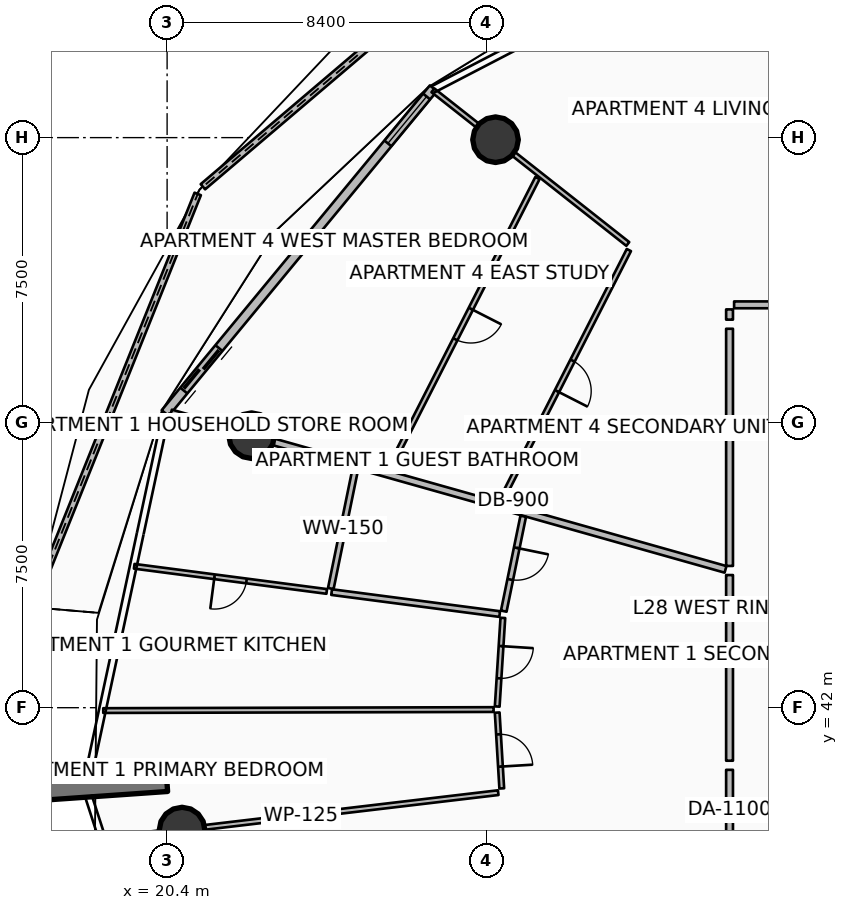
"""IFC4 building model, lengths in metres.
Left out: names, types, materials, properties, quantities, classifications, styles, units other than length and angle.
Written with IfcOpenShell. Run it as: python <this file> out.ifc"""

import sys

from ifc_helpers import new_model, si_unit, direction, frame, frame_2d, origin, origin_2d, place, context, subcontext, project, spatial, polyline, rectangle, circle, outline, extrude, element, fill, save


model = new_model("IFC4")
c1 = context("Model", 3, precision=1e-05, world=origin(), true_north=direction((0.0, 1.0)))
c2 = subcontext(c1, "Body", "Model", "MODEL_VIEW")
j1 = project(units=[si_unit("LENGTHUNIT", "METRE"), si_unit("PLANEANGLEUNIT", "RADIAN")], contexts=[c1])
p1 = place(None, origin())
s1 = spatial("IfcSite", under=j1, at=p1, CompositionType="ELEMENT")
p2 = place(p1, origin())
s2 = spatial("IfcBuilding", under=s1, at=p2, CompositionType="ELEMENT")
p3 = place(p2, frame((0.0, 0.0, 112.65)))
s3 = spatial("IfcBuildingStorey", under=s2, at=p3, CompositionType="ELEMENT", Elevation=112.65)
p4 = place(p3, frame((20.394, 40.07, 0.0), z_axis=(0.0, 0.0, 1.0), x_axis=(-0.997564163539, -0.069754853754, 0.0)))
e1 = element("IfcWall", 1, at=p4, inside=s3, PredefinedType="SOLIDWALL", context=c2, shape_type="SweptSolid", body=[
    extrude(rectangle(XDim=3.5, YDim=0.55, at=frame_2d((1.75, 0.0))), origin(), (0.0, 0.0, 1.0), 3.75),
])
p5 = place(p3, frame((29.042, 56.945, 0.0), z_axis=(0.23244676176, -0.183255946608, 0.95518886142), x_axis=(0.619114149501, 0.785301005913, 0.0)))
e2 = element("IfcColumn", 2, at=p5, inside=s3, PredefinedType="COLUMN", context=c2, shape_type="SweptSolid", body=[
    extrude(circle(Radius=0.6, at=origin_2d()), origin(), (0.0, 0.0, 1.0), 3.633),
])
p6 = place(p3, frame((22.623, 49.157, 0.0), z_axis=(0.308482748796, -0.087033586072, 0.947239963574), x_axis=(0.271534237934, 0.962428780549, 0.0)))
e3 = element("IfcColumn", 3, at=p6, inside=s3, PredefinedType="COLUMN", context=c2, shape_type="SweptSolid", body=[
    extrude(circle(Radius=0.6, at=origin_2d()), origin(), (0.0, 0.0, 1.0), 3.664),
])
p7 = place(p3, frame((20.793, 38.78, 0.0), z_axis=(0.329335891795, 0.039026502293, 0.943405958479), x_axis=(-0.117677249874, 0.993051894345, 0.0)))
e4 = element("IfcColumn", 4, at=p7, inside=s3, PredefinedType="COLUMN", context=c2, shape_type="SweptSolid", body=[
    extrude(circle(Radius=0.6, at=origin_2d()), origin(), (0.0, 0.0, 1.0), 3.678),
])
p8 = place(p3, frame((29.874, 62.962, 0.0), z_axis=(0.0, 0.0, 1.0), x_axis=(-0.761849488871, -0.647754086291, 0.0)))
e5 = element("IfcWall", 5, at=p8, inside=s3, PredefinedType="PARAPET", context=c2, shape_type="SweptSolid", body=[
    extrude(outline(polyline([(0.0, 0.0), (11.2, 0.0), (11.2, 1.632), (5.6, 1.798), (0.0, 1.86), (0.0, 0.0)])), frame((0.0, 0.09, 0.0), z_axis=(0.0, -1.0, 0.0), x_axis=(1.0, 0.0, 0.0)), (0.0, 0.0, 1.0), 0.18),
])
p9 = place(p3, frame((21.206, 55.518, 0.0), z_axis=(0.0, 0.0, 1.0), x_axis=(-0.372543477275, -0.928014739937, 0.0)))
e6 = element("IfcWall", 6, at=p9, inside=s3, PredefinedType="PARAPET", context=c2, shape_type="SweptSolid", body=[
    extrude(outline(polyline([(0.0, 0.0), (11.718, 0.0), (11.718, 1.233), (5.859, 1.418), (0.0, 1.632), (0.0, 0.0)])), frame((0.0, 0.09, 0.0), z_axis=(0.0, -1.0, 0.0), x_axis=(1.0, 0.0, 0.0)), (0.0, 0.0, 1.0), 0.18),
])
p10 = place(p3, frame((27.407, 58.298, 0.0), z_axis=(0.0, 0.0, 1.0), x_axis=(-0.636704975, -0.771107498868, 0.0)))
e7 = element("IfcWall", 7, at=p10, inside=s3, PredefinedType="SOLIDWALL", context=c2, shape_type="SweptSolid", body=[
    extrude(rectangle(XDim=11.084, YDim=0.24, at=frame_2d((5.542, 0.0))), origin(), (0.0, 0.0, 1.0), 2.42),
])
p11 = place(p10, frame((8.864, 0.0, 0.0)))
e8 = element("IfcOpeningElement", 8, at=p11, cuts=e7, PredefinedType="OPENING", context=c2, shape_type="SweptSolid", body=[
    extrude(rectangle(XDim=1.45, YDim=2.15, at=frame_2d((0.725, 1.075))), frame((0.0, 0.13, 0.0), z_axis=(0.0, -1.0, 0.0), x_axis=(1.0, 0.0, 0.0)), (0.0, 0.0, 1.0), 0.26),
])
p12 = place(p10, frame((0.28, 0.0, 0.65)))
e9 = element("IfcOpeningElement", 9, at=p12, cuts=e7, PredefinedType="OPENING", context=c2, shape_type="SweptSolid", body=[
    extrude(rectangle(XDim=1.6, YDim=1.5, at=frame_2d((0.8, 0.75))), frame((0.0, 0.13, 0.0), z_axis=(0.0, -1.0, 0.0), x_axis=(1.0, 0.0, 0.0)), (0.0, 0.0, 1.0), 0.26),
])
p13 = place(p3, frame((35.094, 45.64, 0.0), z_axis=(0.0, 0.0, 1.0), x_axis=(-0.962454745894, 0.271442189251, 0.0)))
e10 = element("IfcWall", 10, at=p13, inside=s3, PredefinedType="PARTITIONING", context=c2, shape_type="SweptSolid", body=[
    extrude(rectangle(XDim=15.162, YDim=0.18, at=frame_2d((7.581, 0.0))), origin(), (0.0, 0.0, 1.0), 2.427),
])
p14 = place(p3, frame((35.2, 40.365, 0.0), z_axis=(0.0, 0.0, 1.0), x_axis=(0.0, -1.0, 0.0)))
e11 = element("IfcWall", 11, at=p14, inside=s3, PredefinedType="PARTITIONING", context=c2, shape_type="SweptSolid", body=[
    extrude(rectangle(XDim=5.413, YDim=0.18, at=frame_2d((2.707, 0.0))), origin(), (0.0, 0.0, 1.0), 2.427),
])
p15 = place(p14, frame((2.156, 0.0, 0.0)))
e12 = element("IfcOpeningElement", 12, at=p15, cuts=e11, PredefinedType="OPENING", context=c2, shape_type="SweptSolid", body=[
    extrude(rectangle(XDim=1.1, YDim=2.1, at=frame_2d((0.55, 1.05))), frame((0.0, 0.1, 0.0), z_axis=(0.0, -1.0, 0.0), x_axis=(1.0, 0.0, 0.0)), (0.0, 0.0, 1.0), 0.2),
])
p16 = place(p3, frame((35.2, 45.49, 0.0), z_axis=(0.0, 0.0, 1.0), x_axis=(0.0, -1.0, 0.0)))
e13 = element("IfcWall", 13, at=p16, inside=s3, PredefinedType="PARTITIONING", context=c2, shape_type="SweptSolid", body=[
    extrude(rectangle(XDim=4.885, YDim=0.18, at=frame_2d((2.442, 0.0))), origin(), (0.0, 0.0, 1.0), 2.427),
])
p17 = place(p3, frame((29.113, 39.764, 0.0), z_axis=(0.0, 0.0, 1.0), x_axis=(-0.993070875002, -0.117516965677, 0.0)))
e14 = element("IfcWall", 14, at=p17, inside=s3, PredefinedType="PARTITIONING", context=c2, shape_type="SweptSolid", body=[
    extrude(rectangle(XDim=10.46, YDim=0.125, at=frame_2d((5.23, 0.0))), origin(), (0.0, 0.0, 1.0), 2.427),
])
p18 = place(p3, frame((29.771, 47.037, 0.0), z_axis=(0.0, 0.0, 1.0), x_axis=(-0.201031337284, -0.979584810739, 0.0)))
e15 = element("IfcWall", 15, at=p18, inside=s3, PredefinedType="PARTITIONING", context=c2, shape_type="SweptSolid", body=[
    extrude(rectangle(XDim=2.549, YDim=0.15, at=frame_2d((1.274, 0.0))), origin(), (0.0, 0.0, 1.0), 2.427),
])
p19 = place(p18, frame((0.85, 0.0, 0.0)))
e16 = element("IfcOpeningElement", 16, at=p19, cuts=e15, PredefinedType="OPENING", context=c2, shape_type="SweptSolid", body=[
    extrude(rectangle(XDim=0.85, YDim=2.06, at=frame_2d((0.425, 1.03))), frame((0.0, 0.085, 0.0), z_axis=(0.0, -1.0, 0.0), x_axis=(1.0, 0.0, 0.0)), (0.0, 0.0, 1.0), 0.17),
])
p20 = place(p3, frame((25.354, 48.283, 0.0), z_axis=(0.0, 0.0, 1.0), x_axis=(-0.201037617238, -0.979583521939, 0.0)))
e17 = element("IfcWall", 17, at=p20, inside=s3, PredefinedType="PARTITIONING", context=c2, shape_type="SweptSolid", body=[
    extrude(rectangle(XDim=3.213, YDim=0.15, at=frame_2d((1.607, 0.0))), origin(), (0.0, 0.0, 1.0), 2.427),
])
p21 = place(p3, frame((29.151, 44.464, 0.0), z_axis=(0.0, 0.0, 1.0), x_axis=(-0.991563130501, 0.129624682181, 0.0)))
e18 = element("IfcWall", 18, at=p21, inside=s3, PredefinedType="PARTITIONING", context=c2, shape_type="SweptSolid", body=[
    extrude(rectangle(XDim=4.46, YDim=0.15, at=frame_2d((2.23, 0.0))), origin(), (0.0, 0.0, 1.0), 2.91),
])
p22 = place(p3, frame((24.6, 45.059, 0.0), z_axis=(0.0, 0.0, 1.0), x_axis=(-0.991566000337, 0.129602727501, 0.0)))
e19 = element("IfcWall", 19, at=p22, inside=s3, PredefinedType="PARTITIONING", context=c2, shape_type="SweptSolid", body=[
    extrude(rectangle(XDim=5.109, YDim=0.125, at=frame_2d((2.554, 0.0))), origin(), (0.0, 0.0, 1.0), 2.445),
])
p23 = place(p22, frame((2.129, 0.0, 0.0)))
e20 = element("IfcOpeningElement", 20, at=p23, cuts=e19, PredefinedType="OPENING", context=c2, shape_type="SweptSolid", body=[
    extrude(rectangle(XDim=0.85, YDim=2.06, at=frame_2d((0.425, 1.03))), frame((0.0, 0.073, 0.0), z_axis=(0.0, -1.0, 0.0), x_axis=(1.0, 0.0, 0.0)), (0.0, 0.0, 1.0), 0.145),
])
p24 = place(p3, frame((28.991, 41.951, 0.0), z_axis=(0.0, 0.0, 1.0), x_axis=(-0.999996643903, -0.002590788034, 0.0)))
e21 = element("IfcWall", 21, at=p24, inside=s3, PredefinedType="PARTITIONING", context=c2, shape_type="SweptSolid", body=[
    extrude(rectangle(XDim=10.271, YDim=0.125, at=frame_2d((5.136, 0.0))), origin(), (0.0, 0.0, 1.0), 2.445),
])
p25 = place(p3, frame((29.235, 44.362, 0.0), z_axis=(0.0, 0.0, 1.0), x_axis=(-0.063647003528, -0.99797247404, 0.0)))
e22 = element("IfcWall", 22, at=p25, inside=s3, PredefinedType="PARTITIONING", context=c2, shape_type="SweptSolid", body=[
    extrude(rectangle(XDim=2.336, YDim=0.125, at=frame_2d((1.168, 0.0))), origin(), (0.0, 0.0, 1.0), 2.91),
])
p26 = place(p25, frame((0.743, 0.0, 0.0)))
e23 = element("IfcOpeningElement", 23, at=p26, cuts=e22, PredefinedType="OPENING", context=c2, shape_type="SweptSolid", body=[
    extrude(rectangle(XDim=0.85, YDim=2.06, at=frame_2d((0.425, 1.03))), frame((0.0, 0.073, 0.0), z_axis=(0.0, -1.0, 0.0), x_axis=(1.0, 0.0, 0.0)), (0.0, 0.0, 1.0), 0.145),
])
p27 = place(p3, frame((29.086, 41.871, 0.0), z_axis=(0.0, 0.0, 1.0), x_axis=(0.060104090143, -0.99819211495, 0.0)))
e24 = element("IfcWall", 24, at=p27, inside=s3, PredefinedType="PARTITIONING", context=c2, shape_type="SweptSolid", body=[
    extrude(rectangle(XDim=1.999, YDim=0.125, at=frame_2d((0.999, 0.0))), origin(), (0.0, 0.0, 1.0), 2.427),
])
p28 = place(p27, frame((0.574, 0.0, 0.0)))
e25 = element("IfcOpeningElement", 25, at=p28, cuts=e24, PredefinedType="OPENING", context=c2, shape_type="SweptSolid", body=[
    extrude(rectangle(XDim=0.85, YDim=2.06, at=frame_2d((0.425, 1.03))), frame((0.0, 0.073, 0.0), z_axis=(0.0, -1.0, 0.0), x_axis=(1.0, 0.0, 0.0)), (0.0, 0.0, 1.0), 0.145),
])
p29 = place(p3, frame((41.944, 52.6, 0.0), z_axis=(0.0, 0.0, 1.0), x_axis=(-1.0, 0.0, 0.0)))
e26 = element("IfcWall", 26, at=p29, inside=s3, PredefinedType="PARTITIONING", context=c2, shape_type="SweptSolid", body=[
    extrude(rectangle(XDim=6.624, YDim=0.18, at=frame_2d((3.312, 0.0))), origin(), (0.0, 0.0, 1.0), 2.427),
])
p30 = place(p29, frame((2.762, 0.0, 0.0)))
e27 = element("IfcOpeningElement", 27, at=p30, cuts=e26, PredefinedType="OPENING", context=c2, shape_type="SweptSolid", body=[
    extrude(rectangle(XDim=1.1, YDim=2.1, at=frame_2d((0.55, 1.05))), frame((0.0, 0.1, 0.0), z_axis=(0.0, -1.0, 0.0), x_axis=(1.0, 0.0, 0.0)), (0.0, 0.0, 1.0), 0.2),
])
p31 = place(p3, frame((35.2, 52.48, 0.0), z_axis=(0.0, 0.0, 1.0), x_axis=(0.0, -1.0, 0.0)))
e28 = element("IfcWall", 28, at=p31, inside=s3, PredefinedType="PARTITIONING", context=c2, shape_type="SweptSolid", body=[
    extrude(rectangle(XDim=0.269, YDim=0.18, at=frame_2d((0.135, 0.0))), origin(), (0.0, 0.0, 1.0), 2.427),
])
p32 = place(p3, frame((35.2, 51.971, 0.0), z_axis=(0.0, 0.0, 1.0), x_axis=(0.0, -1.0, 0.0)))
e29 = element("IfcWall", 29, at=p32, inside=s3, PredefinedType="PARTITIONING", context=c2, shape_type="SweptSolid", body=[
    extrude(rectangle(XDim=6.241, YDim=0.18, at=frame_2d((3.12, 0.0))), origin(), (0.0, 0.0, 1.0), 2.427),
])
p33 = place(p3, frame((32.522, 54.202, 0.0), z_axis=(0.0, 0.0, 1.0), x_axis=(-0.785296086335, 0.619120389574, 0.0)))
e30 = element("IfcWall", 30, at=p33, inside=s3, PredefinedType="PARTITIONING", context=c2, shape_type="SweptSolid", body=[
    extrude(rectangle(XDim=6.529, YDim=0.125, at=frame_2d((3.265, 0.0))), origin(), (0.0, 0.0, 1.0), 2.427),
])
p34 = place(p3, frame((32.551, 54.042, 0.0), z_axis=(0.0, 0.0, 1.0), x_axis=(-0.45400796994, -0.890997622461, 0.0)))
e31 = element("IfcWall", 31, at=p34, inside=s3, PredefinedType="PARTITIONING", context=c2, shape_type="SweptSolid", body=[
    extrude(rectangle(XDim=7.431, YDim=0.125, at=frame_2d((3.716, 0.0))), origin(), (0.0, 0.0, 1.0), 2.427),
])
p35 = place(p34, frame((3.265, 0.0, 0.0)))
e32 = element("IfcOpeningElement", 32, at=p35, cuts=e31, PredefinedType="OPENING", context=c2, shape_type="SweptSolid", body=[
    extrude(rectangle(XDim=0.9, YDim=2.08, at=frame_2d((0.45, 1.04))), frame((0.0, 0.073, 0.0), z_axis=(0.0, -1.0, 0.0), x_axis=(1.0, 0.0, 0.0)), (0.0, 0.0, 1.0), 0.145),
])
p36 = place(p3, frame((30.146, 55.938, 0.0), z_axis=(0.0, 0.0, 1.0), x_axis=(-0.454004640198, -0.890999319124, 0.0)))
e33 = element("IfcWall", 33, at=p36, inside=s3, PredefinedType="PARTITIONING", context=c2, shape_type="SweptSolid", body=[
    extrude(rectangle(XDim=8.626, YDim=0.125, at=frame_2d((4.313, 0.0))), origin(), (0.0, 0.0, 1.0), 2.427),
])
p37 = place(p36, frame((3.863, 0.0, 0.0)))
e34 = element("IfcOpeningElement", 34, at=p37, cuts=e33, PredefinedType="OPENING", context=c2, shape_type="SweptSolid", body=[
    extrude(rectangle(XDim=0.9, YDim=2.08, at=frame_2d((0.45, 1.04))), frame((0.0, 0.073, 0.0), z_axis=(0.0, -1.0, 0.0), x_axis=(1.0, 0.0, 0.0)), (0.0, 0.0, 1.0), 0.145),
])
p38 = place(p11, origin())
e35 = element("IfcDoor", 35, at=p38, inside=s3, OperationType="DOUBLE_DOOR_SLIDING", PredefinedType="DOOR", context=c2, shape_type="SweptSolid", body=[
    extrude(rectangle(XDim=1.45, YDim=2.15, at=frame_2d((0.725, 1.075))), frame((0.0, 0.025, 0.0), z_axis=(0.0, -1.0, 0.0), x_axis=(1.0, 0.0, 0.0)), (0.0, 0.0, 1.0), 0.05),
])
fill(e8, e35)
p39 = place(p12, origin())
e36 = element("IfcWindow", 36, at=p39, inside=s3, PartitioningType="SINGLE_PANEL", PredefinedType="WINDOW", context=c2, shape_type="SweptSolid", body=[
    extrude(rectangle(XDim=1.6, YDim=1.5, at=frame_2d((0.8, 0.75))), frame((0.0, 0.03, 0.0), z_axis=(0.0, -1.0, 0.0), x_axis=(1.0, 0.0, 0.0)), (0.0, 0.0, 1.0), 0.06),
])
fill(e9, e36)
p40 = place(p19, origin())
e37 = element("IfcDoor", 37, at=p40, inside=s3, OperationType="SINGLE_SWING_LEFT", PredefinedType="DOOR", context=c2, shape_type="SweptSolid", body=[
    extrude(rectangle(XDim=0.85, YDim=2.06, at=frame_2d((0.425, 1.03))), frame((0.0, 0.025, 0.0), z_axis=(0.0, -1.0, 0.0), x_axis=(1.0, 0.0, 0.0)), (0.0, 0.0, 1.0), 0.05),
])
fill(e16, e37)
p41 = place(p23, origin())
e38 = element("IfcDoor", 38, at=p41, inside=s3, OperationType="SINGLE_SWING_RIGHT", PredefinedType="DOOR", context=c2, shape_type="SweptSolid", body=[
    extrude(rectangle(XDim=0.85, YDim=2.06, at=frame_2d((0.425, 1.03))), frame((0.0, 0.025, 0.0), z_axis=(0.0, -1.0, 0.0), x_axis=(1.0, 0.0, 0.0)), (0.0, 0.0, 1.0), 0.05),
])
fill(e20, e38)
p42 = place(p26, origin())
e39 = element("IfcDoor", 39, at=p42, inside=s3, OperationType="SINGLE_SWING_LEFT", PredefinedType="DOOR", context=c2, shape_type="SweptSolid", body=[
    extrude(rectangle(XDim=0.85, YDim=2.06, at=frame_2d((0.425, 1.03))), frame((0.0, 0.025, 0.0), z_axis=(0.0, -1.0, 0.0), x_axis=(1.0, 0.0, 0.0)), (0.0, 0.0, 1.0), 0.05),
])
fill(e23, e39)
p43 = place(p28, origin())
e40 = element("IfcDoor", 40, at=p43, inside=s3, OperationType="SINGLE_SWING_RIGHT", PredefinedType="DOOR", context=c2, shape_type="SweptSolid", body=[
    extrude(rectangle(XDim=0.85, YDim=2.06, at=frame_2d((0.425, 1.03))), frame((0.0, 0.025, 0.0), z_axis=(0.0, -1.0, 0.0), x_axis=(1.0, 0.0, 0.0)), (0.0, 0.0, 1.0), 0.05),
])
fill(e25, e40)
p44 = place(p35, origin())
e41 = element("IfcDoor", 41, at=p44, inside=s3, OperationType="SINGLE_SWING_RIGHT", PredefinedType="DOOR", context=c2, shape_type="SweptSolid", body=[
    extrude(rectangle(XDim=0.9, YDim=2.08, at=frame_2d((0.45, 1.04))), frame((0.0, 0.025, 0.0), z_axis=(0.0, -1.0, 0.0), x_axis=(1.0, 0.0, 0.0)), (0.0, 0.0, 1.0), 0.05),
])
fill(e32, e41)
p45 = place(p37, origin())
e42 = element("IfcDoor", 42, at=p45, inside=s3, OperationType="SINGLE_SWING_LEFT", PredefinedType="DOOR", context=c2, shape_type="SweptSolid", body=[
    extrude(rectangle(XDim=0.9, YDim=2.08, at=frame_2d((0.45, 1.04))), frame((0.0, 0.025, 0.0), z_axis=(0.0, -1.0, 0.0), x_axis=(1.0, 0.0, 0.0)), (0.0, 0.0, 1.0), 0.05),
])
fill(e34, e42)
save(model, sys.argv[1])
